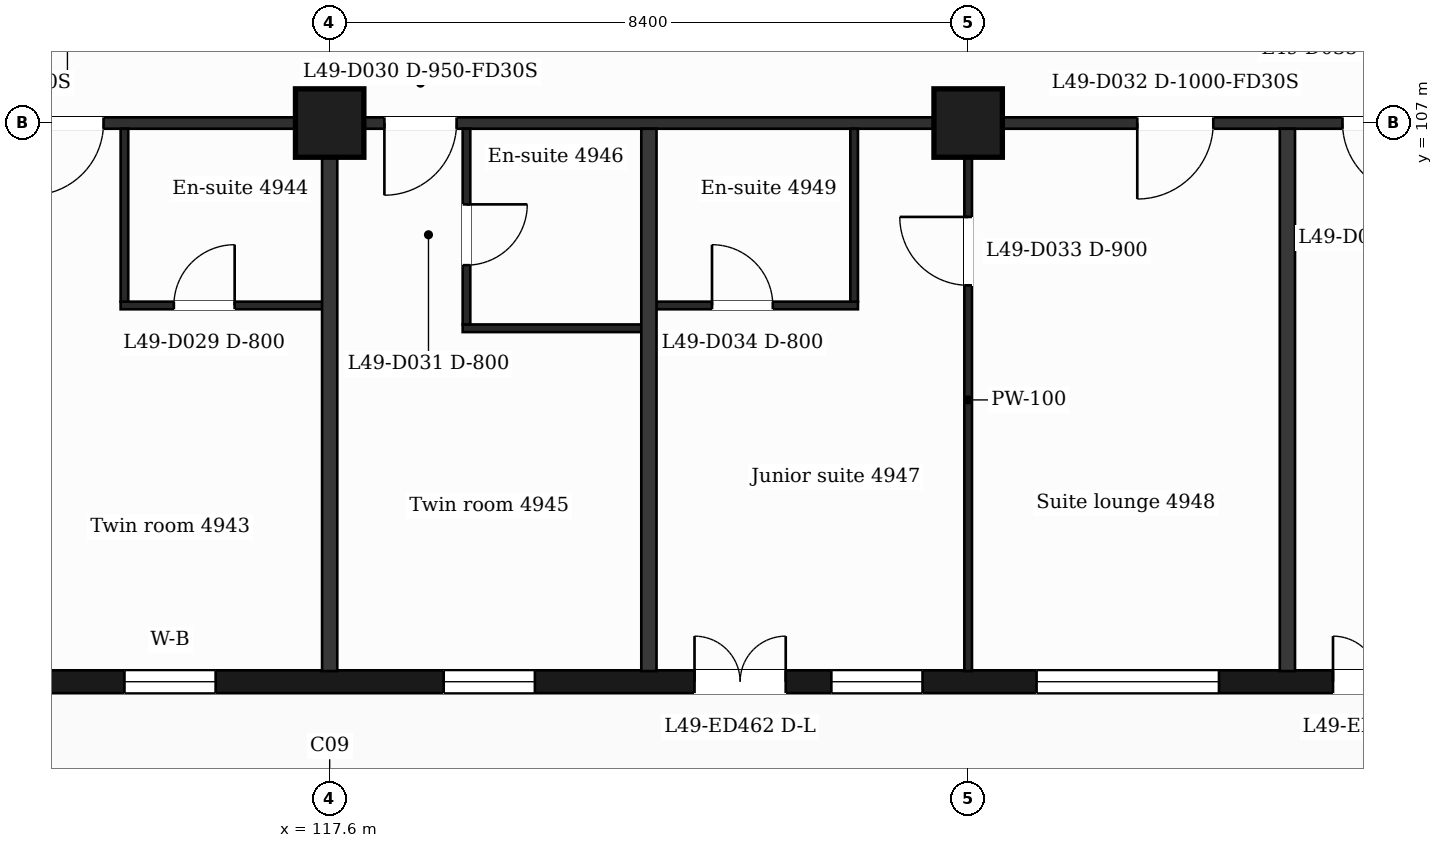
"""IFC4 building model, lengths in metres.
Left out: names, types, materials, properties, quantities, classifications, styles, units other than length and angle.
Written with IfcOpenShell. Run it as: python <this file> out.ifc"""

import sys

from ifc_helpers import new_model, si_unit, direction, frame, frame_2d, origin, origin_2d, place, context, subcontext, project, spatial, rectangle, extrude, element, fill, save


model = new_model("IFC4")
c1 = context("Model", 3, precision=1e-05, world=origin(), true_north=direction((0.0, 1.0)))
c2 = subcontext(c1, "Body", "Model", "MODEL_VIEW")
j1 = project(units=[si_unit("LENGTHUNIT", "METRE"), si_unit("PLANEANGLEUNIT", "RADIAN")], contexts=[c1])
p1 = place(None, origin())
s1 = spatial("IfcSite", under=j1, at=p1, CompositionType="ELEMENT")
p2 = place(p1, origin())
s2 = spatial("IfcBuilding", under=s1, at=p2, CompositionType="ELEMENT")
p3 = place(p2, frame((0.0, 0.0, 205.9)))
s3 = spatial("IfcBuildingStorey", under=s2, at=p3, CompositionType="ELEMENT", Elevation=205.9)
for number, where, z_axis, x_axis in (
    (1, (117.6, 107.0, 0.0), (0.0, 0.0, 1.0), (1.0, 0.0, 0.0)),
    (2, (126.0, 107.0, 0.0), (0.0, 0.0, 1.0), (1.0, 0.0, 0.0)),
):
    element("IfcColumn", number, at=place(p3, frame(where, z_axis=z_axis, x_axis=x_axis)), inside=s3, PredefinedType="COLUMN", context=c2, shape_type="SweptSolid", body=[
        extrude(rectangle(XDim=0.9, YDim=0.9, at=origin_2d()), origin(), (0.0, 0.0, 1.0), 3.7),
    ])
p4 = place(p3, frame((89.85, 99.65, 0.0), z_axis=(0.0, 0.0, 1.0), x_axis=(1.0, 0.0, 0.0)))
e3 = element("IfcWall", 3, at=p4, inside=s3, PredefinedType="SOLIDWALL", context=c2, shape_type="SweptSolid", body=[
    extrude(rectangle(XDim=47.25, YDim=0.3, at=frame_2d((23.625, 0.0))), origin(), (0.0, 0.0, 1.0), 3.38),
])
p5 = place(p4, frame((0.725, 0.0, 0.9)))
e4 = element("IfcOpeningElement", 4, at=p5, cuts=e3, PredefinedType="OPENING", context=c2, shape_type="SweptSolid", body=[
    extrude(rectangle(XDim=1.2, YDim=2.1, at=frame_2d((0.6, 1.05))), frame((0.0, 0.16, 0.0), z_axis=(0.0, -1.0, 0.0), x_axis=(1.0, 0.0, 0.0)), (0.0, 0.0, 1.0), 0.32),
])
p6 = place(p4, frame((3.45, 0.0, 0.9)))
e5 = element("IfcOpeningElement", 5, at=p6, cuts=e3, PredefinedType="OPENING", context=c2, shape_type="SweptSolid", body=[
    extrude(rectangle(XDim=2.4, YDim=2.1, at=frame_2d((1.2, 1.05))), frame((0.0, 0.16, 0.0), z_axis=(0.0, -1.0, 0.0), x_axis=(1.0, 0.0, 0.0)), (0.0, 0.0, 1.0), 0.32),
])
p7 = place(p4, frame((7.65, 0.0, 0.9)))
e6 = element("IfcOpeningElement", 6, at=p7, cuts=e3, PredefinedType="OPENING", context=c2, shape_type="SweptSolid", body=[
    extrude(rectangle(XDim=2.4, YDim=2.1, at=frame_2d((1.2, 1.05))), frame((0.0, 0.16, 0.0), z_axis=(0.0, -1.0, 0.0), x_axis=(1.0, 0.0, 0.0)), (0.0, 0.0, 1.0), 0.32),
])
p8 = place(p4, frame((11.85, 0.0, 0.9)))
e7 = element("IfcOpeningElement", 7, at=p8, cuts=e3, PredefinedType="OPENING", context=c2, shape_type="SweptSolid", body=[
    extrude(rectangle(XDim=2.4, YDim=2.1, at=frame_2d((1.2, 1.05))), frame((0.0, 0.16, 0.0), z_axis=(0.0, -1.0, 0.0), x_axis=(1.0, 0.0, 0.0)), (0.0, 0.0, 1.0), 0.32),
])
p9 = place(p4, frame((16.05, 0.0, 0.9)))
e8 = element("IfcOpeningElement", 8, at=p9, cuts=e3, PredefinedType="OPENING", context=c2, shape_type="SweptSolid", body=[
    extrude(rectangle(XDim=2.4, YDim=2.1, at=frame_2d((1.2, 1.05))), frame((0.0, 0.16, 0.0), z_axis=(0.0, -1.0, 0.0), x_axis=(1.0, 0.0, 0.0)), (0.0, 0.0, 1.0), 0.32),
])
p10 = place(p4, frame((20.25, 0.0, 0.9)))
e9 = element("IfcOpeningElement", 9, at=p10, cuts=e3, PredefinedType="OPENING", context=c2, shape_type="SweptSolid", body=[
    extrude(rectangle(XDim=2.4, YDim=2.1, at=frame_2d((1.2, 1.05))), frame((0.0, 0.16, 0.0), z_axis=(0.0, -1.0, 0.0), x_axis=(1.0, 0.0, 0.0)), (0.0, 0.0, 1.0), 0.32),
])
p11 = place(p4, frame((25.05, 0.0, 0.9)))
e10 = element("IfcOpeningElement", 10, at=p11, cuts=e3, PredefinedType="OPENING", context=c2, shape_type="SweptSolid", body=[
    extrude(rectangle(XDim=1.2, YDim=2.1, at=frame_2d((0.6, 1.05))), frame((0.0, 0.16, 0.0), z_axis=(0.0, -1.0, 0.0), x_axis=(1.0, 0.0, 0.0)), (0.0, 0.0, 1.0), 0.32),
])
p12 = place(p4, frame((29.25, 0.0, 0.9)))
e11 = element("IfcOpeningElement", 11, at=p12, cuts=e3, PredefinedType="OPENING", context=c2, shape_type="SweptSolid", body=[
    extrude(rectangle(XDim=1.2, YDim=2.1, at=frame_2d((0.6, 1.05))), frame((0.0, 0.16, 0.0), z_axis=(0.0, -1.0, 0.0), x_axis=(1.0, 0.0, 0.0)), (0.0, 0.0, 1.0), 0.32),
])
p13 = place(p4, frame((32.55, 0.0, 0.0)))
e12 = element("IfcOpeningElement", 12, at=p13, cuts=e3, PredefinedType="OPENING", context=c2, shape_type="SweptSolid", body=[
    extrude(rectangle(XDim=1.2, YDim=2.4, at=frame_2d((0.6, 1.2))), frame((0.0, 0.16, 0.0), z_axis=(0.0, -1.0, 0.0), x_axis=(1.0, 0.0, 0.0)), (0.0, 0.0, 1.0), 0.32),
])
p14 = place(p4, frame((34.35, 0.0, 0.9)))
e13 = element("IfcOpeningElement", 13, at=p14, cuts=e3, PredefinedType="OPENING", context=c2, shape_type="SweptSolid", body=[
    extrude(rectangle(XDim=1.2, YDim=2.1, at=frame_2d((0.6, 1.05))), frame((0.0, 0.16, 0.0), z_axis=(0.0, -1.0, 0.0), x_axis=(1.0, 0.0, 0.0)), (0.0, 0.0, 1.0), 0.32),
])
p15 = place(p4, frame((37.05, 0.0, 0.9)))
e14 = element("IfcOpeningElement", 14, at=p15, cuts=e3, PredefinedType="OPENING", context=c2, shape_type="SweptSolid", body=[
    extrude(rectangle(XDim=2.4, YDim=2.1, at=frame_2d((1.2, 1.05))), frame((0.0, 0.16, 0.0), z_axis=(0.0, -1.0, 0.0), x_axis=(1.0, 0.0, 0.0)), (0.0, 0.0, 1.0), 0.32),
])
p16 = place(p4, frame((40.95, 0.0, 0.0)))
e15 = element("IfcOpeningElement", 15, at=p16, cuts=e3, PredefinedType="OPENING", context=c2, shape_type="SweptSolid", body=[
    extrude(rectangle(XDim=1.2, YDim=2.4, at=frame_2d((0.6, 1.2))), frame((0.0, 0.16, 0.0), z_axis=(0.0, -1.0, 0.0), x_axis=(1.0, 0.0, 0.0)), (0.0, 0.0, 1.0), 0.32),
])
p17 = place(p4, frame((42.75, 0.0, 0.9)))
e16 = element("IfcOpeningElement", 16, at=p17, cuts=e3, PredefinedType="OPENING", context=c2, shape_type="SweptSolid", body=[
    extrude(rectangle(XDim=1.2, YDim=2.1, at=frame_2d((0.6, 1.05))), frame((0.0, 0.16, 0.0), z_axis=(0.0, -1.0, 0.0), x_axis=(1.0, 0.0, 0.0)), (0.0, 0.0, 1.0), 0.32),
])
p18 = place(p4, frame((45.25, 0.0, 0.9)))
e17 = element("IfcOpeningElement", 17, at=p18, cuts=e3, PredefinedType="OPENING", context=c2, shape_type="SweptSolid", body=[
    extrude(rectangle(XDim=1.2, YDim=2.1, at=frame_2d((0.6, 1.05))), frame((0.0, 0.16, 0.0), z_axis=(0.0, -1.0, 0.0), x_axis=(1.0, 0.0, 0.0)), (0.0, 0.0, 1.0), 0.32),
])
p19 = place(p3, frame((119.35, 104.3, 0.0), z_axis=(0.0, 0.0, 1.0), x_axis=(1.0, 0.0, 0.0)))
e18 = element("IfcWall", 18, at=p19, inside=s3, PredefinedType="PARTITIONING", context=c2, shape_type="SweptSolid", body=[
    extrude(rectangle(XDim=2.45, YDim=0.1, at=frame_2d((1.225, 0.0))), origin(), (0.0, 0.0, 1.0), 3.38),
])
p20 = place(p3, frame((114.85, 104.6, 0.0), z_axis=(0.0, 0.0, 1.0), x_axis=(1.0, 0.0, 0.0)))
e19 = element("IfcWall", 19, at=p20, inside=s3, PredefinedType="PARTITIONING", context=c2, shape_type="SweptSolid", body=[
    extrude(rectangle(XDim=2.75, YDim=0.1, at=frame_2d((1.375, 0.0))), origin(), (0.0, 0.0, 1.0), 3.38),
])
p21 = place(p20, frame((0.7, 0.0, 0.0)))
e20 = element("IfcOpeningElement", 20, at=p21, cuts=e19, PredefinedType="OPENING", context=c2, shape_type="SweptSolid", body=[
    extrude(rectangle(XDim=0.8, YDim=2.1, at=frame_2d((0.4, 1.05))), frame((0.0, 0.06, 0.0), z_axis=(0.0, -1.0, 0.0), x_axis=(1.0, 0.0, 0.0)), (0.0, 0.0, 1.0), 0.12),
])
p22 = place(p3, frame((121.8, 104.6, 0.0), z_axis=(0.0, 0.0, 1.0), x_axis=(1.0, 0.0, 0.0)))
e21 = element("IfcWall", 21, at=p22, inside=s3, PredefinedType="PARTITIONING", context=c2, shape_type="SweptSolid", body=[
    extrude(rectangle(XDim=2.75, YDim=0.1, at=frame_2d((1.375, 0.0))), origin(), (0.0, 0.0, 1.0), 3.38),
])
p23 = place(p22, frame((0.83, 0.0, 0.0)))
e22 = element("IfcOpeningElement", 22, at=p23, cuts=e21, PredefinedType="OPENING", context=c2, shape_type="SweptSolid", body=[
    extrude(rectangle(XDim=0.8, YDim=2.1, at=frame_2d((0.4, 1.05))), frame((0.0, 0.06, 0.0), z_axis=(0.0, -1.0, 0.0), x_axis=(1.0, 0.0, 0.0)), (0.0, 0.0, 1.0), 0.12),
])
p24 = place(p3, frame((87.018, 107.0, 0.0), z_axis=(0.0, 0.0, 1.0), x_axis=(1.0, 0.0, 0.0)))
e23 = element("IfcWall", 23, at=p24, inside=s3, PredefinedType="PARTITIONING", context=c2, shape_type="SweptSolid", body=[
    extrude(rectangle(XDim=52.765, YDim=0.15, at=frame_2d((26.382, 0.0))), origin(), (0.0, 0.0, 1.0), 3.38),
])
p25 = place(p24, frame((1.276, 0.0, 0.0)))
e24 = element("IfcOpeningElement", 24, at=p25, cuts=e23, PredefinedType="OPENING", context=c2, shape_type="SweptSolid", body=[
    extrude(rectangle(XDim=0.95, YDim=2.1, at=frame_2d((0.475, 1.05))), frame((0.0, 0.085, 0.0), z_axis=(0.0, -1.0, 0.0), x_axis=(1.0, 0.0, 0.0)), (0.0, 0.0, 1.0), 0.17),
])
p26 = place(p24, frame((6.369, 0.0, 0.0)))
e25 = element("IfcOpeningElement", 25, at=p26, cuts=e23, PredefinedType="OPENING", context=c2, shape_type="SweptSolid", body=[
    extrude(rectangle(XDim=0.95, YDim=2.1, at=frame_2d((0.475, 1.05))), frame((0.0, 0.085, 0.0), z_axis=(0.0, -1.0, 0.0), x_axis=(1.0, 0.0, 0.0)), (0.0, 0.0, 1.0), 0.17),
])
p27 = place(p24, frame((12.112, 0.0, 0.0)))
e26 = element("IfcOpeningElement", 26, at=p27, cuts=e23, PredefinedType="OPENING", context=c2, shape_type="SweptSolid", body=[
    extrude(rectangle(XDim=0.95, YDim=2.1, at=frame_2d((0.475, 1.05))), frame((0.0, 0.085, 0.0), z_axis=(0.0, -1.0, 0.0), x_axis=(1.0, 0.0, 0.0)), (0.0, 0.0, 1.0), 0.17),
])
p28 = place(p24, frame((14.582, 0.0, 0.0)))
e27 = element("IfcOpeningElement", 27, at=p28, cuts=e23, PredefinedType="OPENING", context=c2, shape_type="SweptSolid", body=[
    extrude(rectangle(XDim=0.95, YDim=2.1, at=frame_2d((0.475, 1.05))), frame((0.0, 0.085, 0.0), z_axis=(0.0, -1.0, 0.0), x_axis=(1.0, 0.0, 0.0)), (0.0, 0.0, 1.0), 0.17),
])
p29 = place(p24, frame((20.512, 0.0, 0.0)))
e28 = element("IfcOpeningElement", 28, at=p29, cuts=e23, PredefinedType="OPENING", context=c2, shape_type="SweptSolid", body=[
    extrude(rectangle(XDim=0.95, YDim=2.1, at=frame_2d((0.475, 1.05))), frame((0.0, 0.085, 0.0), z_axis=(0.0, -1.0, 0.0), x_axis=(1.0, 0.0, 0.0)), (0.0, 0.0, 1.0), 0.17),
])
p30 = place(p24, frame((25.157, 0.0, 0.0)))
e29 = element("IfcOpeningElement", 29, at=p30, cuts=e23, PredefinedType="OPENING", context=c2, shape_type="SweptSolid", body=[
    extrude(rectangle(XDim=0.95, YDim=2.1, at=frame_2d((0.475, 1.05))), frame((0.0, 0.085, 0.0), z_axis=(0.0, -1.0, 0.0), x_axis=(1.0, 0.0, 0.0)), (0.0, 0.0, 1.0), 0.17),
])
p31 = place(p24, frame((26.657, 0.0, 0.0)))
e30 = element("IfcOpeningElement", 30, at=p31, cuts=e23, PredefinedType="OPENING", context=c2, shape_type="SweptSolid", body=[
    extrude(rectangle(XDim=0.95, YDim=2.1, at=frame_2d((0.475, 1.05))), frame((0.0, 0.085, 0.0), z_axis=(0.0, -1.0, 0.0), x_axis=(1.0, 0.0, 0.0)), (0.0, 0.0, 1.0), 0.17),
])
p32 = place(p24, frame((31.302, 0.0, 0.0)))
e31 = element("IfcOpeningElement", 31, at=p32, cuts=e23, PredefinedType="OPENING", context=c2, shape_type="SweptSolid", body=[
    extrude(rectangle(XDim=0.95, YDim=2.1, at=frame_2d((0.475, 1.05))), frame((0.0, 0.085, 0.0), z_axis=(0.0, -1.0, 0.0), x_axis=(1.0, 0.0, 0.0)), (0.0, 0.0, 1.0), 0.17),
])
p33 = place(p24, frame((41.207, 0.0, 0.0)))
e32 = element("IfcOpeningElement", 32, at=p33, cuts=e23, PredefinedType="OPENING", context=c2, shape_type="SweptSolid", body=[
    extrude(rectangle(XDim=1.0, YDim=2.1, at=frame_2d((0.5, 1.05))), frame((0.0, 0.085, 0.0), z_axis=(0.0, -1.0, 0.0), x_axis=(1.0, 0.0, 0.0)), (0.0, 0.0, 1.0), 0.17),
])
p34 = place(p24, frame((43.907, 0.0, 0.0)))
e33 = element("IfcOpeningElement", 33, at=p34, cuts=e23, PredefinedType="OPENING", context=c2, shape_type="SweptSolid", body=[
    extrude(rectangle(XDim=0.95, YDim=2.1, at=frame_2d((0.475, 1.05))), frame((0.0, 0.085, 0.0), z_axis=(0.0, -1.0, 0.0), x_axis=(1.0, 0.0, 0.0)), (0.0, 0.0, 1.0), 0.17),
])
p35 = place(p24, frame((49.285, 0.0, 0.0)))
e34 = element("IfcOpeningElement", 34, at=p35, cuts=e23, PredefinedType="OPENING", context=c2, shape_type="SweptSolid", body=[
    extrude(rectangle(XDim=0.95, YDim=2.1, at=frame_2d((0.475, 1.05))), frame((0.0, 0.085, 0.0), z_axis=(0.0, -1.0, 0.0), x_axis=(1.0, 0.0, 0.0)), (0.0, 0.0, 1.0), 0.17),
])
p36 = place(p3, frame((114.9, 104.65, 0.0), z_axis=(0.0, 0.0, 1.0), x_axis=(0.0, 1.0, 0.0)))
e35 = element("IfcWall", 35, at=p36, inside=s3, PredefinedType="PARTITIONING", context=c2, shape_type="SweptSolid", body=[
    extrude(rectangle(XDim=2.275, YDim=0.1, at=frame_2d((1.138, 0.0))), origin(), (0.0, 0.0, 1.0), 3.38),
])
p37 = place(p3, frame((117.6, 99.79, 0.0), z_axis=(0.0, 0.0, 1.0), x_axis=(0.0, 1.0, 0.0)))
e36 = element("IfcWall", 36, at=p37, inside=s3, PredefinedType="PARTITIONING", context=c2, shape_type="SweptSolid", body=[
    extrude(rectangle(XDim=7.135, YDim=0.2, at=frame_2d((3.567, 0.0))), origin(), (0.0, 0.0, 1.0), 3.38),
])
p38 = place(p3, frame((119.4, 104.35, 0.0), z_axis=(0.0, 0.0, 1.0), x_axis=(0.0, 1.0, 0.0)))
e37 = element("IfcWall", 37, at=p38, inside=s3, PredefinedType="PARTITIONING", context=c2, shape_type="SweptSolid", body=[
    extrude(rectangle(XDim=2.575, YDim=0.1, at=frame_2d((1.288, 0.0))), origin(), (0.0, 0.0, 1.0), 3.38),
])
p39 = place(p38, frame((0.78, 0.0, 0.0)))
e38 = element("IfcOpeningElement", 38, at=p39, cuts=e37, PredefinedType="OPENING", context=c2, shape_type="SweptSolid", body=[
    extrude(rectangle(XDim=0.8, YDim=2.1, at=frame_2d((0.4, 1.05))), frame((0.0, 0.06, 0.0), z_axis=(0.0, -1.0, 0.0), x_axis=(1.0, 0.0, 0.0)), (0.0, 0.0, 1.0), 0.12),
])
p40 = place(p3, frame((121.8, 99.79, 0.0), z_axis=(0.0, 0.0, 1.0), x_axis=(0.0, 1.0, 0.0)))
e39 = element("IfcWall", 39, at=p40, inside=s3, PredefinedType="PARTITIONING", context=c2, shape_type="SweptSolid", body=[
    extrude(rectangle(XDim=7.135, YDim=0.2, at=frame_2d((3.567, 0.0))), origin(), (0.0, 0.0, 1.0), 3.38),
])
p41 = place(p3, frame((124.5, 104.65, 0.0), z_axis=(0.0, 0.0, 1.0), x_axis=(0.0, 1.0, 0.0)))
e40 = element("IfcWall", 40, at=p41, inside=s3, PredefinedType="PARTITIONING", context=c2, shape_type="SweptSolid", body=[
    extrude(rectangle(XDim=2.275, YDim=0.1, at=frame_2d((1.138, 0.0))), origin(), (0.0, 0.0, 1.0), 3.38),
])
p42 = place(p3, frame((126.0, 99.79, 0.0), z_axis=(0.0, 0.0, 1.0), x_axis=(0.0, 1.0, 0.0)))
e41 = element("IfcWall", 41, at=p42, inside=s3, PredefinedType="PARTITIONING", context=c2, shape_type="SweptSolid", body=[
    extrude(rectangle(XDim=7.135, YDim=0.1, at=frame_2d((3.567, 0.0))), origin(), (0.0, 0.0, 1.0), 3.38),
])
p43 = place(p42, frame((5.075, 0.0, 0.0)))
e42 = element("IfcOpeningElement", 42, at=p43, cuts=e41, PredefinedType="OPENING", context=c2, shape_type="SweptSolid", body=[
    extrude(rectangle(XDim=0.9, YDim=2.1, at=frame_2d((0.45, 1.05))), frame((0.0, 0.06, 0.0), z_axis=(0.0, -1.0, 0.0), x_axis=(1.0, 0.0, 0.0)), (0.0, 0.0, 1.0), 0.12),
])
p44 = place(p3, frame((130.2, 99.79, 0.0), z_axis=(0.0, 0.0, 1.0), x_axis=(0.0, 1.0, 0.0)))
e43 = element("IfcWall", 43, at=p44, inside=s3, PredefinedType="PARTITIONING", context=c2, shape_type="SweptSolid", body=[
    extrude(rectangle(XDim=7.135, YDim=0.2, at=frame_2d((3.567, 0.0))), origin(), (0.0, 0.0, 1.0), 3.38),
])
p45 = place(p11, origin())
e44 = element("IfcWindow", 44, at=p45, inside=s3, PartitioningType="SINGLE_PANEL", PredefinedType="WINDOW", context=c2, shape_type="SweptSolid", body=[
    extrude(rectangle(XDim=1.2, YDim=2.1, at=frame_2d((0.6, 1.05))), frame((0.0, 0.03, 0.0), z_axis=(0.0, -1.0, 0.0), x_axis=(1.0, 0.0, 0.0)), (0.0, 0.0, 1.0), 0.06),
])
fill(e10, e44)
p46 = place(p12, origin())
e45 = element("IfcWindow", 45, at=p46, inside=s3, PartitioningType="SINGLE_PANEL", PredefinedType="WINDOW", context=c2, shape_type="SweptSolid", body=[
    extrude(rectangle(XDim=1.2, YDim=2.1, at=frame_2d((0.6, 1.05))), frame((0.0, 0.03, 0.0), z_axis=(0.0, -1.0, 0.0), x_axis=(1.0, 0.0, 0.0)), (0.0, 0.0, 1.0), 0.06),
])
fill(e11, e45)
p47 = place(p13, origin())
e46 = element("IfcDoor", 46, at=p47, inside=s3, OperationType="DOUBLE_DOOR_SINGLE_SWING", PredefinedType="DOOR", context=c2, shape_type="SweptSolid", body=[
    extrude(rectangle(XDim=1.2, YDim=2.4, at=frame_2d((0.6, 1.2))), frame((0.0, 0.025, 0.0), z_axis=(0.0, -1.0, 0.0), x_axis=(1.0, 0.0, 0.0)), (0.0, 0.0, 1.0), 0.05),
])
fill(e12, e46)
p48 = place(p14, origin())
e47 = element("IfcWindow", 47, at=p48, inside=s3, PartitioningType="SINGLE_PANEL", PredefinedType="WINDOW", context=c2, shape_type="SweptSolid", body=[
    extrude(rectangle(XDim=1.2, YDim=2.1, at=frame_2d((0.6, 1.05))), frame((0.0, 0.03, 0.0), z_axis=(0.0, -1.0, 0.0), x_axis=(1.0, 0.0, 0.0)), (0.0, 0.0, 1.0), 0.06),
])
fill(e13, e47)
p49 = place(p15, origin())
e48 = element("IfcWindow", 48, at=p49, inside=s3, PartitioningType="SINGLE_PANEL", PredefinedType="WINDOW", context=c2, shape_type="SweptSolid", body=[
    extrude(rectangle(XDim=2.4, YDim=2.1, at=frame_2d((1.2, 1.05))), frame((0.0, 0.03, 0.0), z_axis=(0.0, -1.0, 0.0), x_axis=(1.0, 0.0, 0.0)), (0.0, 0.0, 1.0), 0.06),
])
fill(e14, e48)
p50 = place(p16, origin())
e49 = element("IfcDoor", 49, at=p50, inside=s3, OperationType="DOUBLE_DOOR_SINGLE_SWING", PredefinedType="DOOR", context=c2, shape_type="SweptSolid", body=[
    extrude(rectangle(XDim=1.2, YDim=2.4, at=frame_2d((0.6, 1.2))), frame((0.0, 0.025, 0.0), z_axis=(0.0, -1.0, 0.0), x_axis=(1.0, 0.0, 0.0)), (0.0, 0.0, 1.0), 0.05),
])
fill(e15, e49)
p51 = place(p31, origin())
e50 = element("IfcDoor", 50, at=p51, inside=s3, OperationType="SINGLE_SWING_LEFT", PredefinedType="DOOR", context=c2, shape_type="SweptSolid", body=[
    extrude(rectangle(XDim=0.95, YDim=2.1, at=frame_2d((0.475, 1.05))), frame((0.0, 0.025, 0.0), z_axis=(0.0, -1.0, 0.0), x_axis=(1.0, 0.0, 0.0)), (0.0, 0.0, 1.0), 0.05),
])
fill(e30, e50)
p52 = place(p21, origin())
e51 = element("IfcDoor", 51, at=p52, inside=s3, OperationType="SINGLE_SWING_RIGHT", PredefinedType="DOOR", context=c2, shape_type="SweptSolid", body=[
    extrude(rectangle(XDim=0.8, YDim=2.1, at=frame_2d((0.4, 1.05))), frame((0.0, 0.025, 0.0), z_axis=(0.0, -1.0, 0.0), x_axis=(1.0, 0.0, 0.0)), (0.0, 0.0, 1.0), 0.05),
])
fill(e20, e51)
p53 = place(p32, origin())
e52 = element("IfcDoor", 52, at=p53, inside=s3, OperationType="SINGLE_SWING_LEFT", PredefinedType="DOOR", context=c2, shape_type="SweptSolid", body=[
    extrude(rectangle(XDim=0.95, YDim=2.1, at=frame_2d((0.475, 1.05))), frame((0.0, 0.025, 0.0), z_axis=(0.0, -1.0, 0.0), x_axis=(1.0, 0.0, 0.0)), (0.0, 0.0, 1.0), 0.05),
])
fill(e31, e52)
p54 = place(p39, origin())
e53 = element("IfcDoor", 53, at=p54, inside=s3, OperationType="SINGLE_SWING_RIGHT", PredefinedType="DOOR", context=c2, shape_type="SweptSolid", body=[
    extrude(rectangle(XDim=0.8, YDim=2.1, at=frame_2d((0.4, 1.05))), frame((0.0, 0.025, 0.0), z_axis=(0.0, -1.0, 0.0), x_axis=(1.0, 0.0, 0.0)), (0.0, 0.0, 1.0), 0.05),
])
fill(e38, e53)
p55 = place(p33, origin())
e54 = element("IfcDoor", 54, at=p55, inside=s3, OperationType="SINGLE_SWING_LEFT", PredefinedType="DOOR", context=c2, shape_type="SweptSolid", body=[
    extrude(rectangle(XDim=1.0, YDim=2.1, at=frame_2d((0.5, 1.05))), frame((0.0, 0.025, 0.0), z_axis=(0.0, -1.0, 0.0), x_axis=(1.0, 0.0, 0.0)), (0.0, 0.0, 1.0), 0.05),
])
fill(e32, e54)
p56 = place(p43, origin())
e55 = element("IfcDoor", 55, at=p56, inside=s3, OperationType="SINGLE_SWING_RIGHT", PredefinedType="DOOR", context=c2, shape_type="SweptSolid", body=[
    extrude(rectangle(XDim=0.9, YDim=2.1, at=frame_2d((0.45, 1.05))), frame((0.0, 0.025, 0.0), z_axis=(0.0, -1.0, 0.0), x_axis=(1.0, 0.0, 0.0)), (0.0, 0.0, 1.0), 0.05),
])
fill(e42, e55)
p57 = place(p23, origin())
e56 = element("IfcDoor", 56, at=p57, inside=s3, OperationType="SINGLE_SWING_LEFT", PredefinedType="DOOR", context=c2, shape_type="SweptSolid", body=[
    extrude(rectangle(XDim=0.8, YDim=2.1, at=frame_2d((0.4, 1.05))), frame((0.0, 0.025, 0.0), z_axis=(0.0, -1.0, 0.0), x_axis=(1.0, 0.0, 0.0)), (0.0, 0.0, 1.0), 0.05),
])
fill(e22, e56)
p58 = place(p34, origin())
e57 = element("IfcDoor", 57, at=p58, inside=s3, OperationType="SINGLE_SWING_RIGHT", PredefinedType="DOOR", context=c2, shape_type="SweptSolid", body=[
    extrude(rectangle(XDim=0.95, YDim=2.1, at=frame_2d((0.475, 1.05))), frame((0.0, 0.025, 0.0), z_axis=(0.0, -1.0, 0.0), x_axis=(1.0, 0.0, 0.0)), (0.0, 0.0, 1.0), 0.05),
])
fill(e33, e57)
save(model, sys.argv[1])
